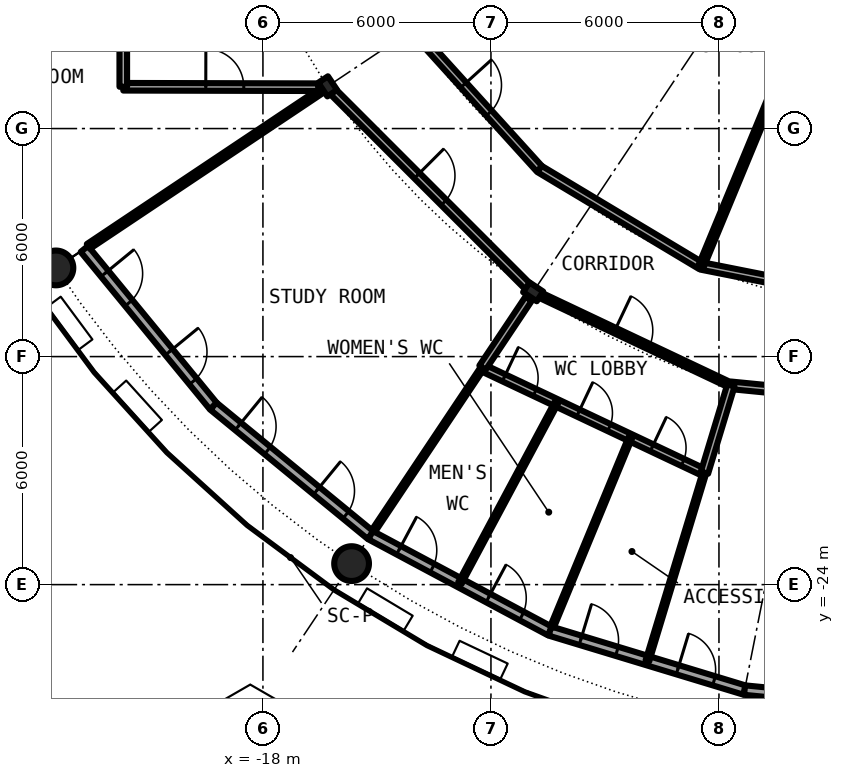
"""IFC4 building model, lengths in metres.
Left out: names, types, materials, properties, quantities, classifications, styles, units other than length and angle.
Written with IfcOpenShell. Run it as: python <this file> out.ifc"""

import sys

from ifc_helpers import new_model, si_unit, direction, frame, frame_2d, origin, origin_2d, place, context, subcontext, project, spatial, rectangle, hollow_circle, i_section, extrude, element, fill, save


model = new_model("IFC4")
c1 = context("Model", 3, precision=1e-05, world=origin(), true_north=direction((0.0, 1.0)))
c2 = subcontext(c1, "Body", "Model", "MODEL_VIEW")
j1 = project(units=[si_unit("LENGTHUNIT", "METRE"), si_unit("PLANEANGLEUNIT", "RADIAN")], contexts=[c1])
p1 = place(None, origin())
s1 = spatial("IfcSite", under=j1, at=p1, CompositionType="ELEMENT")
p2 = place(p1, origin())
s2 = spatial("IfcBuilding", under=s1, at=p2, CompositionType="ELEMENT")
p3 = place(p2, frame((0.0, 0.0, 107.45)))
s3 = spatial("IfcBuildingStorey", under=s2, at=p3, CompositionType="ELEMENT", Elevation=107.45)
for number, where, z_axis, x_axis in (
    (1, (-23.448, -15.667, 0.0), (0.0, 0.0, 1.0), (1.0, 0.0, 0.0)),
    (2, (-15.667, -23.448, 0.0), (0.0, 0.0, 1.0), (1.0, 0.0, 0.0)),
):
    element("IfcColumn", number, at=place(p3, frame(where, z_axis=z_axis, x_axis=x_axis)), inside=s3, PredefinedType="COLUMN", context=c2, shape_type="SweptSolid", body=[
        extrude(hollow_circle(Radius=0.457, WallThickness=0.04, at=origin_2d()), origin(), (0.0, 0.0, 1.0), 4.2),
    ])
for number, where, z_axis, x_axis in (
    (3, (-16.297, -10.889, 0.0), (0.0, 0.0, 1.0), (-0.831, -0.556, 0.0)),
    (4, (-10.889, -16.297, 0.0), (0.0, 0.0, 1.0), (-0.556, -0.831, 0.0)),
):
    element("IfcColumn", number, at=place(p3, frame(where, z_axis=z_axis, x_axis=x_axis)), inside=s3, PredefinedType="COLUMN", context=c2, shape_type="SweptSolid", body=[
        extrude(i_section(OverallWidth=0.307, OverallDepth=0.432, WebThickness=0.021, FlangeThickness=0.04, FilletRadius=0.027, at=origin_2d()), origin(), (0.0, 0.0, 1.0), 4.2),
    ])
p4 = place(p3, frame((-22.699, -15.167, 0.0), z_axis=(0.0, 0.0, 1.0), x_axis=(0.634382322723, -0.773019449054, 0.0)))
e5 = element("IfcWall", 5, at=p4, inside=s3, PredefinedType="SOLIDWALL", context=c2, shape_type="SweptSolid", body=[
    extrude(rectangle(XDim=5.352, YDim=0.25, at=frame_2d((2.676, 0.0))), origin(), (0.0, 0.0, 1.0), 3.85),
])
p5 = place(p4, frame((0.841, 0.0, 0.0)))
e6 = element("IfcOpeningElement", 6, at=p5, cuts=e5, PredefinedType="OPENING", context=c2, shape_type="SweptSolid", body=[
    extrude(rectangle(XDim=1.0, YDim=2.2, at=frame_2d((0.5, 1.1))), frame((0.0, 0.135, 0.0), z_axis=(0.0, -1.0, 0.0), x_axis=(1.0, 0.0, 0.0)), (0.0, 0.0, 1.0), 0.27),
])
p6 = place(p4, frame((3.51, 0.0, 0.0)))
e7 = element("IfcOpeningElement", 7, at=p6, cuts=e5, PredefinedType="OPENING", context=c2, shape_type="SweptSolid", body=[
    extrude(rectangle(XDim=1.0, YDim=2.2, at=frame_2d((0.5, 1.1))), frame((0.0, 0.135, 0.0), z_axis=(0.0, -1.0, 0.0), x_axis=(1.0, 0.0, 0.0)), (0.0, 0.0, 1.0), 0.27),
])
p7 = place(p3, frame((-19.304, -19.304, 0.0), z_axis=(0.0, 0.0, 1.0), x_axis=(0.773019449054, -0.634382322723, 0.0)))
e8 = element("IfcWall", 8, at=p7, inside=s3, PredefinedType="SOLIDWALL", context=c2, shape_type="SweptSolid", body=[
    extrude(rectangle(XDim=5.352, YDim=0.25, at=frame_2d((2.676, 0.0))), origin(), (0.0, 0.0, 1.0), 3.85),
])
p8 = place(p7, frame((0.841, 0.0, 0.0)))
e9 = element("IfcOpeningElement", 9, at=p8, cuts=e8, PredefinedType="OPENING", context=c2, shape_type="SweptSolid", body=[
    extrude(rectangle(XDim=1.0, YDim=2.2, at=frame_2d((0.5, 1.1))), frame((0.0, 0.135, 0.0), z_axis=(0.0, -1.0, 0.0), x_axis=(1.0, 0.0, 0.0)), (0.0, 0.0, 1.0), 0.27),
])
p9 = place(p7, frame((3.51, 0.0, 0.0)))
e10 = element("IfcOpeningElement", 10, at=p9, cuts=e8, PredefinedType="OPENING", context=c2, shape_type="SweptSolid", body=[
    extrude(rectangle(XDim=1.0, YDim=2.2, at=frame_2d((0.5, 1.1))), frame((0.0, 0.135, 0.0), z_axis=(0.0, -1.0, 0.0), x_axis=(1.0, 0.0, 0.0)), (0.0, 0.0, 1.0), 0.27),
])
p10 = place(p3, frame((-15.167, -22.699, 0.0), z_axis=(0.0, 0.0, 1.0), x_axis=(0.881915646801, -0.471407246368, 0.0)))
e11 = element("IfcWall", 11, at=p10, inside=s3, PredefinedType="SOLIDWALL", context=c2, shape_type="SweptSolid", body=[
    extrude(rectangle(XDim=5.352, YDim=0.25, at=frame_2d((2.676, 0.0))), origin(), (0.0, 0.0, 1.0), 3.85),
])
p11 = place(p10, frame((0.841, 0.0, 0.0)))
e12 = element("IfcOpeningElement", 12, at=p11, cuts=e11, PredefinedType="OPENING", context=c2, shape_type="SweptSolid", body=[
    extrude(rectangle(XDim=1.0, YDim=2.2, at=frame_2d((0.5, 1.1))), frame((0.0, 0.135, 0.0), z_axis=(0.0, -1.0, 0.0), x_axis=(1.0, 0.0, 0.0)), (0.0, 0.0, 1.0), 0.27),
])
p12 = place(p10, frame((3.51, 0.0, 0.0)))
e13 = element("IfcOpeningElement", 13, at=p12, cuts=e11, PredefinedType="OPENING", context=c2, shape_type="SweptSolid", body=[
    extrude(rectangle(XDim=1.0, YDim=2.2, at=frame_2d((0.5, 1.1))), frame((0.0, 0.135, 0.0), z_axis=(0.0, -1.0, 0.0), x_axis=(1.0, 0.0, 0.0)), (0.0, 0.0, 1.0), 0.27),
])
p13 = place(p3, frame((-10.447, -25.222, 0.0), z_axis=(0.0, 0.0, 1.0), x_axis=(0.956965678721, -0.290201119486, 0.0)))
e14 = element("IfcWall", 14, at=p13, inside=s3, PredefinedType="SOLIDWALL", context=c2, shape_type="SweptSolid", body=[
    extrude(rectangle(XDim=5.351, YDim=0.25, at=frame_2d((2.676, 0.0))), origin(), (0.0, 0.0, 1.0), 3.85),
])
p14 = place(p13, frame((0.841, 0.0, 0.0)))
e15 = element("IfcOpeningElement", 15, at=p14, cuts=e14, PredefinedType="OPENING", context=c2, shape_type="SweptSolid", body=[
    extrude(rectangle(XDim=1.0, YDim=2.2, at=frame_2d((0.5, 1.1))), frame((0.0, 0.135, 0.0), z_axis=(0.0, -1.0, 0.0), x_axis=(1.0, 0.0, 0.0)), (0.0, 0.0, 1.0), 0.27),
])
p15 = place(p13, frame((3.51, 0.0, 0.0)))
e16 = element("IfcOpeningElement", 16, at=p15, cuts=e14, PredefinedType="OPENING", context=c2, shape_type="SweptSolid", body=[
    extrude(rectangle(XDim=1.0, YDim=2.2, at=frame_2d((0.5, 1.1))), frame((0.0, 0.135, 0.0), z_axis=(0.0, -1.0, 0.0), x_axis=(1.0, 0.0, 0.0)), (0.0, 0.0, 1.0), 0.27),
])
p16 = place(p3, frame((-5.326, -26.775, 0.0), z_axis=(0.0, 0.0, 1.0), x_axis=(0.995173996315, -0.098126026407, 0.0)))
e17 = element("IfcWall", 17, at=p16, inside=s3, PredefinedType="SOLIDWALL", context=c2, shape_type="SweptSolid", body=[
    extrude(rectangle(XDim=5.352, YDim=0.25, at=frame_2d((2.676, 0.0))), origin(), (0.0, 0.0, 1.0), 3.85),
])
p17 = place(p16, frame((0.841, 0.0, 0.0)))
e18 = element("IfcOpeningElement", 18, at=p17, cuts=e17, PredefinedType="OPENING", context=c2, shape_type="SweptSolid", body=[
    extrude(rectangle(XDim=1.0, YDim=2.2, at=frame_2d((0.5, 1.1))), frame((0.0, 0.135, 0.0), z_axis=(0.0, -1.0, 0.0), x_axis=(1.0, 0.0, 0.0)), (0.0, 0.0, 1.0), 0.27),
])
p18 = place(p16, frame((3.51, 0.0, 0.0)))
e19 = element("IfcOpeningElement", 19, at=p18, cuts=e17, PredefinedType="OPENING", context=c2, shape_type="SweptSolid", body=[
    extrude(rectangle(XDim=1.0, YDim=2.2, at=frame_2d((0.5, 1.1))), frame((0.0, 0.135, 0.0), z_axis=(0.0, -1.0, 0.0), x_axis=(1.0, 0.0, 0.0)), (0.0, 0.0, 1.0), 0.27),
])
p19 = place(p3, frame((-12.223, -18.294, 0.0), z_axis=(0.0, 0.0, 1.0), x_axis=(0.904110764787, -0.427298168726, 0.0)))
e20 = element("IfcWall", 20, at=p19, inside=s3, PredefinedType="PARTITIONING", context=c2, shape_type="SweptSolid", body=[
    extrude(rectangle(XDim=6.459, YDim=0.2, at=frame_2d((3.229, 0.0))), origin(), (0.0, 0.0, 1.0), 3.85),
])
p20 = place(p19, frame((0.624, 0.0, 0.0)))
e21 = element("IfcOpeningElement", 21, at=p20, cuts=e20, PredefinedType="OPENING", context=c2, shape_type="SweptSolid", body=[
    extrude(rectangle(XDim=0.9, YDim=2.3, at=frame_2d((0.45, 1.15))), frame((0.0, 0.11, 0.0), z_axis=(0.0, -1.0, 0.0), x_axis=(1.0, 0.0, 0.0)), (0.0, 0.0, 1.0), 0.22),
])
p21 = place(p19, frame((2.788, 0.0, 0.0)))
e22 = element("IfcOpeningElement", 22, at=p21, cuts=e20, PredefinedType="OPENING", context=c2, shape_type="SweptSolid", body=[
    extrude(rectangle(XDim=0.9, YDim=2.3, at=frame_2d((0.45, 1.15))), frame((0.0, 0.11, 0.0), z_axis=(0.0, -1.0, 0.0), x_axis=(1.0, 0.0, 0.0)), (0.0, 0.0, 1.0), 0.22),
])
p22 = place(p19, frame((4.93, 0.0, 0.0)))
e23 = element("IfcOpeningElement", 23, at=p22, cuts=e20, PredefinedType="OPENING", context=c2, shape_type="SweptSolid", body=[
    extrude(rectangle(XDim=0.9, YDim=2.3, at=frame_2d((0.45, 1.15))), frame((0.0, 0.11, 0.0), z_axis=(0.0, -1.0, 0.0), x_axis=(1.0, 0.0, 0.0)), (0.0, 0.0, 1.0), 0.22),
])
p23 = place(p3, frame((-10.749, -16.363, 0.0), z_axis=(0.0, 0.0, 1.0), x_axis=(0.903968655954, -0.427598724335, 0.0)))
e24 = element("IfcWall", 24, at=p23, inside=s3, PredefinedType="PARTITIONING", context=c2, shape_type="SweptSolid", body=[
    extrude(rectangle(XDim=5.596, YDim=0.15, at=frame_2d((2.798, 0.0))), origin(), (0.0, 0.0, 1.0), 3.54),
])
p24 = place(p23, frame((2.221, 0.0, 0.0)))
e25 = element("IfcOpeningElement", 25, at=p24, cuts=e24, PredefinedType="OPENING", context=c2, shape_type="SweptSolid", body=[
    extrude(rectangle(XDim=1.0, YDim=2.3, at=frame_2d((0.5, 1.15))), frame((0.0, 0.085, 0.0), z_axis=(0.0, -1.0, 0.0), x_axis=(1.0, 0.0, 0.0)), (0.0, 0.0, 1.0), 0.17),
])
p25 = place(p3, frame((-16.186, -11.0, 0.0), z_axis=(0.0, 0.0, 1.0), x_axis=(0.707106781187, -0.707106781187, 0.0)))
e26 = element("IfcWall", 26, at=p25, inside=s3, PredefinedType="PARTITIONING", context=c2, shape_type="SweptSolid", body=[
    extrude(rectangle(XDim=7.334, YDim=0.2, at=frame_2d((3.667, 0.0))), origin(), (0.0, 0.0, 1.0), 3.54),
])
p26 = place(p25, frame((3.167, 0.0, 0.0)))
e27 = element("IfcOpeningElement", 27, at=p26, cuts=e26, PredefinedType="OPENING", context=c2, shape_type="SweptSolid", body=[
    extrude(rectangle(XDim=1.0, YDim=2.3, at=frame_2d((0.5, 1.15))), frame((0.0, 0.11, 0.0), z_axis=(0.0, -1.0, 0.0), x_axis=(1.0, 0.0, 0.0)), (0.0, 0.0, 1.0), 0.22),
])
p27 = place(p3, frame((-5.69, -18.756, 0.0), z_axis=(0.0, 0.0, 1.0), x_axis=(0.995179652705, -0.098068643521, 0.0)))
e28 = element("IfcWall", 28, at=p27, inside=s3, PredefinedType="PARTITIONING", context=c2, shape_type="SweptSolid", body=[
    extrude(rectangle(XDim=7.648, YDim=0.2, at=frame_2d((3.824, 0.0))), origin(), (0.0, 0.0, 1.0), 3.54),
])
p28 = place(p27, frame((2.924, 0.0, 0.0)))
e29 = element("IfcOpeningElement", 29, at=p28, cuts=e28, PredefinedType="OPENING", context=c2, shape_type="SweptSolid", body=[
    extrude(rectangle(XDim=1.8, YDim=2.3, at=frame_2d((0.9, 1.15))), frame((0.0, 0.11, 0.0), z_axis=(0.0, -1.0, 0.0), x_axis=(1.0, 0.0, 0.0)), (0.0, 0.0, 1.0), 0.22),
])
p29 = place(p3, frame((-14.052, -9.389, 0.0), z_axis=(0.0, 0.0, 1.0), x_axis=(0.671579385786, -0.740932607318, 0.0)))
e30 = element("IfcWall", 30, at=p29, inside=s3, PredefinedType="PARTITIONING", context=c2, shape_type="SweptSolid", body=[
    extrude(rectangle(XDim=4.96, YDim=0.2, at=frame_2d((2.48, 0.0))), origin(), (0.0, 0.0, 1.0), 3.85),
])
p30 = place(p29, frame((1.98, 0.0, 0.0)))
e31 = element("IfcOpeningElement", 31, at=p30, cuts=e30, PredefinedType="OPENING", context=c2, shape_type="SweptSolid", body=[
    extrude(rectangle(XDim=1.0, YDim=2.3, at=frame_2d((0.5, 1.15))), frame((0.0, 0.11, 0.0), z_axis=(0.0, -1.0, 0.0), x_axis=(1.0, 0.0, 0.0)), (0.0, 0.0, 1.0), 0.22),
])
p31 = place(p3, frame((-10.721, -13.064, 0.0), z_axis=(0.0, 0.0, 1.0), x_axis=(0.857696997328, -0.514155483074, 0.0)))
e32 = element("IfcWall", 32, at=p31, inside=s3, PredefinedType="PARTITIONING", context=c2, shape_type="SweptSolid", body=[
    extrude(rectangle(XDim=4.96, YDim=0.2, at=frame_2d((2.48, 0.0))), origin(), (0.0, 0.0, 1.0), 3.85),
])
p32 = place(p3, frame((-6.467, -15.614, 0.0), z_axis=(0.0, 0.0, 1.0), x_axis=(0.980799374359, -0.195019453537, 0.0)))
e33 = element("IfcWall", 33, at=p32, inside=s3, PredefinedType="PARTITIONING", context=c2, shape_type="SweptSolid", body=[
    extrude(rectangle(XDim=6.594, YDim=0.2, at=frame_2d((3.297, 0.0))), origin(), (0.0, 0.0, 1.0), 3.85),
])
p33 = place(p32, frame((2.797, 0.0, 0.0)))
e34 = element("IfcOpeningElement", 34, at=p33, cuts=e33, PredefinedType="OPENING", context=c2, shape_type="SweptSolid", body=[
    extrude(rectangle(XDim=1.0, YDim=2.3, at=frame_2d((0.5, 1.15))), frame((0.0, 0.11, 0.0), z_axis=(0.0, -1.0, 0.0), x_axis=(1.0, 0.0, 0.0)), (0.0, 0.0, 1.0), 0.22),
])
p34 = place(p3, frame((-21.675, -10.9, 0.0), z_axis=(0.0, 0.0, 1.0), x_axis=(0.999997173357, -0.002377662213, 0.0)))
e35 = element("IfcWall", 35, at=p34, inside=s3, PredefinedType="PARTITIONING", context=c2, shape_type="SweptSolid", body=[
    extrude(rectangle(XDim=5.134, YDim=0.2, at=frame_2d((2.567, 0.0))), origin(), (0.0, 0.0, 1.0), 3.85),
])
p35 = place(p34, frame((2.171, 0.0, 0.0)))
e36 = element("IfcOpeningElement", 36, at=p35, cuts=e35, PredefinedType="OPENING", context=c2, shape_type="SweptSolid", body=[
    extrude(rectangle(XDim=1.0, YDim=2.3, at=frame_2d((0.5, 1.15))), frame((0.0, 0.11, 0.0), z_axis=(0.0, -1.0, 0.0), x_axis=(1.0, 0.0, 0.0)), (0.0, 0.0, 1.0), 0.22),
])
p36 = place(p3, frame((-22.593, -15.101, 0.0), z_axis=(0.0, 0.0, 1.0), x_axis=(0.83143223768, 0.555626164023, 0.0)))
e37 = element("IfcWall", 37, at=p36, inside=s3, PredefinedType="PARTITIONING", context=c2, shape_type="SweptSolid", body=[
    extrude(rectangle(XDim=7.359, YDim=0.15, at=frame_2d((3.68, 0.0))), origin(), (0.0, 0.0, 1.0), 3.85),
])
p37 = place(p3, frame((-15.098, -22.595, 0.0), z_axis=(0.0, 0.0, 1.0), x_axis=(0.555679526155, 0.831396574573, 0.0)))
e38 = element("IfcWall", 38, at=p37, inside=s3, PredefinedType="PARTITIONING", context=c2, shape_type="SweptSolid", body=[
    extrude(rectangle(XDim=5.176, YDim=0.1, at=frame_2d((2.588, 0.0))), origin(), (0.0, 0.0, 1.0), 3.85),
])
p38 = place(p3, frame((-12.818, -23.962, 0.0), z_axis=(0.0, 0.0, 1.0), x_axis=(0.471698142177, 0.881760093601, 0.0)))
e39 = element("IfcWall", 39, at=p38, inside=s3, PredefinedType="PARTITIONING", context=c2, shape_type="SweptSolid", body=[
    extrude(rectangle(XDim=5.387, YDim=0.1, at=frame_2d((2.693, 0.0))), origin(), (0.0, 0.0, 1.0), 3.85),
])
p39 = place(p3, frame((-12.222, -18.292, 0.0), z_axis=(0.0, 0.0, 1.0), x_axis=(0.555628995846, 0.831430345233, 0.0)))
e40 = element("IfcWall", 40, at=p39, inside=s3, PredefinedType="PARTITIONING", context=c2, shape_type="SweptSolid", body=[
    extrude(rectangle(XDim=2.183, YDim=0.2, at=frame_2d((1.091, 0.0))), origin(), (0.0, 0.0, 1.0), 3.85),
])
p40 = place(p3, frame((-10.391, -25.11, 0.0), z_axis=(0.0, 0.0, 1.0), x_axis=(0.38229040446, 0.924042232075, 0.0)))
e41 = element("IfcWall", 41, at=p40, inside=s3, PredefinedType="PARTITIONING", context=c2, shape_type="SweptSolid", body=[
    extrude(rectangle(XDim=5.386, YDim=0.1, at=frame_2d((2.693, 0.0))), origin(), (0.0, 0.0, 1.0), 3.85),
])
p41 = place(p3, frame((-7.883, -26.007, 0.0), z_axis=(0.0, 0.0, 1.0), x_axis=(0.290185435468, 0.95697043478, 0.0)))
e42 = element("IfcWall", 42, at=p41, inside=s3, PredefinedType="PARTITIONING", context=c2, shape_type="SweptSolid", body=[
    extrude(rectangle(XDim=5.176, YDim=0.1, at=frame_2d((2.588, 0.0))), origin(), (0.0, 0.0, 1.0), 3.85),
])
p42 = place(p3, frame((-6.467, -15.614, 0.0), z_axis=(0.0, 0.0, 1.0), x_axis=(0.382646942224, 0.923894646378, 0.0)))
e43 = element("IfcWall", 43, at=p42, inside=s3, PredefinedType="PARTITIONING", context=c2, shape_type="SweptSolid", body=[
    extrude(rectangle(XDim=9.181, YDim=0.15, at=frame_2d((4.59, 0.0))), origin(), (0.0, 0.0, 1.0), 3.85),
])
p43 = place(p3, frame((-6.381, -21.054, 0.0), z_axis=(0.0, 0.0, 1.0), x_axis=(0.290128842027, 0.956987593976, 0.0)))
e44 = element("IfcWall", 44, at=p43, inside=s3, PredefinedType="PARTITIONING", context=c2, shape_type="SweptSolid", body=[
    extrude(rectangle(XDim=2.399, YDim=0.2, at=frame_2d((1.2, 0.0))), origin(), (0.0, 0.0, 1.0), 3.85),
])
p44 = place(p3, frame((-21.675, -10.9, 0.0), z_axis=(0.0, 0.0, 1.0), x_axis=(0.0, 1.0, 0.0)))
e45 = element("IfcWall", 45, at=p44, inside=s3, PredefinedType="PARTITIONING", context=c2, shape_type="SweptSolid", body=[
    extrude(rectangle(XDim=1.7, YDim=0.2, at=frame_2d((0.85, 0.0))), origin(), (0.0, 0.0, 1.0), 3.85),
])
p45 = place(p5, origin())
e46 = element("IfcDoor", 46, at=p45, inside=s3, OperationType="SINGLE_SWING_LEFT", PredefinedType="DOOR", context=c2, shape_type="SweptSolid", body=[
    extrude(rectangle(XDim=1.0, YDim=2.2, at=frame_2d((0.5, 1.1))), frame((0.0, 0.025, 0.0), z_axis=(0.0, -1.0, 0.0), x_axis=(1.0, 0.0, 0.0)), (0.0, 0.0, 1.0), 0.05),
])
fill(e6, e46)
p46 = place(p6, origin())
e47 = element("IfcDoor", 47, at=p46, inside=s3, OperationType="SINGLE_SWING_LEFT", PredefinedType="DOOR", context=c2, shape_type="SweptSolid", body=[
    extrude(rectangle(XDim=1.0, YDim=2.2, at=frame_2d((0.5, 1.1))), frame((0.0, 0.025, 0.0), z_axis=(0.0, -1.0, 0.0), x_axis=(1.0, 0.0, 0.0)), (0.0, 0.0, 1.0), 0.05),
])
fill(e7, e47)
p47 = place(p8, origin())
e48 = element("IfcDoor", 48, at=p47, inside=s3, OperationType="SINGLE_SWING_LEFT", PredefinedType="DOOR", context=c2, shape_type="SweptSolid", body=[
    extrude(rectangle(XDim=1.0, YDim=2.2, at=frame_2d((0.5, 1.1))), frame((0.0, 0.025, 0.0), z_axis=(0.0, -1.0, 0.0), x_axis=(1.0, 0.0, 0.0)), (0.0, 0.0, 1.0), 0.05),
])
fill(e9, e48)
p48 = place(p9, origin())
e49 = element("IfcDoor", 49, at=p48, inside=s3, OperationType="SINGLE_SWING_LEFT", PredefinedType="DOOR", context=c2, shape_type="SweptSolid", body=[
    extrude(rectangle(XDim=1.0, YDim=2.2, at=frame_2d((0.5, 1.1))), frame((0.0, 0.025, 0.0), z_axis=(0.0, -1.0, 0.0), x_axis=(1.0, 0.0, 0.0)), (0.0, 0.0, 1.0), 0.05),
])
fill(e10, e49)
p49 = place(p11, origin())
e50 = element("IfcDoor", 50, at=p49, inside=s3, OperationType="SINGLE_SWING_LEFT", PredefinedType="DOOR", context=c2, shape_type="SweptSolid", body=[
    extrude(rectangle(XDim=1.0, YDim=2.2, at=frame_2d((0.5, 1.1))), frame((0.0, 0.025, 0.0), z_axis=(0.0, -1.0, 0.0), x_axis=(1.0, 0.0, 0.0)), (0.0, 0.0, 1.0), 0.05),
])
fill(e12, e50)
p50 = place(p12, origin())
e51 = element("IfcDoor", 51, at=p50, inside=s3, OperationType="SINGLE_SWING_LEFT", PredefinedType="DOOR", context=c2, shape_type="SweptSolid", body=[
    extrude(rectangle(XDim=1.0, YDim=2.2, at=frame_2d((0.5, 1.1))), frame((0.0, 0.025, 0.0), z_axis=(0.0, -1.0, 0.0), x_axis=(1.0, 0.0, 0.0)), (0.0, 0.0, 1.0), 0.05),
])
fill(e13, e51)
p51 = place(p14, origin())
e52 = element("IfcDoor", 52, at=p51, inside=s3, OperationType="SINGLE_SWING_LEFT", PredefinedType="DOOR", context=c2, shape_type="SweptSolid", body=[
    extrude(rectangle(XDim=1.0, YDim=2.2, at=frame_2d((0.5, 1.1))), frame((0.0, 0.025, 0.0), z_axis=(0.0, -1.0, 0.0), x_axis=(1.0, 0.0, 0.0)), (0.0, 0.0, 1.0), 0.05),
])
fill(e15, e52)
p52 = place(p15, origin())
e53 = element("IfcDoor", 53, at=p52, inside=s3, OperationType="SINGLE_SWING_LEFT", PredefinedType="DOOR", context=c2, shape_type="SweptSolid", body=[
    extrude(rectangle(XDim=1.0, YDim=2.2, at=frame_2d((0.5, 1.1))), frame((0.0, 0.025, 0.0), z_axis=(0.0, -1.0, 0.0), x_axis=(1.0, 0.0, 0.0)), (0.0, 0.0, 1.0), 0.05),
])
fill(e16, e53)
p53 = place(p24, origin())
e54 = element("IfcDoor", 54, at=p53, inside=s3, OperationType="SINGLE_SWING_LEFT", PredefinedType="DOOR", context=c2, shape_type="SweptSolid", body=[
    extrude(rectangle(XDim=1.0, YDim=2.3, at=frame_2d((0.5, 1.15))), frame((0.0, 0.025, 0.0), z_axis=(0.0, -1.0, 0.0), x_axis=(1.0, 0.0, 0.0)), (0.0, 0.0, 1.0), 0.05),
])
fill(e25, e54)
p54 = place(p20, origin())
e55 = element("IfcDoor", 55, at=p54, inside=s3, OperationType="SINGLE_SWING_LEFT", PredefinedType="DOOR", context=c2, shape_type="SweptSolid", body=[
    extrude(rectangle(XDim=0.9, YDim=2.3, at=frame_2d((0.45, 1.15))), frame((0.0, 0.025, 0.0), z_axis=(0.0, -1.0, 0.0), x_axis=(1.0, 0.0, 0.0)), (0.0, 0.0, 1.0), 0.05),
])
fill(e21, e55)
p55 = place(p21, origin())
e56 = element("IfcDoor", 56, at=p55, inside=s3, OperationType="SINGLE_SWING_RIGHT", PredefinedType="DOOR", context=c2, shape_type="SweptSolid", body=[
    extrude(rectangle(XDim=0.9, YDim=2.3, at=frame_2d((0.45, 1.15))), frame((0.0, 0.025, 0.0), z_axis=(0.0, -1.0, 0.0), x_axis=(1.0, 0.0, 0.0)), (0.0, 0.0, 1.0), 0.05),
])
fill(e22, e56)
p56 = place(p22, origin())
e57 = element("IfcDoor", 57, at=p56, inside=s3, OperationType="SINGLE_SWING_RIGHT", PredefinedType="DOOR", context=c2, shape_type="SweptSolid", body=[
    extrude(rectangle(XDim=0.9, YDim=2.3, at=frame_2d((0.45, 1.15))), frame((0.0, 0.025, 0.0), z_axis=(0.0, -1.0, 0.0), x_axis=(1.0, 0.0, 0.0)), (0.0, 0.0, 1.0), 0.05),
])
fill(e23, e57)
p57 = place(p26, origin())
e58 = element("IfcDoor", 58, at=p57, inside=s3, OperationType="SINGLE_SWING_LEFT", PredefinedType="DOOR", context=c2, shape_type="SweptSolid", body=[
    extrude(rectangle(XDim=1.0, YDim=2.3, at=frame_2d((0.5, 1.15))), frame((0.0, 0.025, 0.0), z_axis=(0.0, -1.0, 0.0), x_axis=(1.0, 0.0, 0.0)), (0.0, 0.0, 1.0), 0.05),
])
fill(e27, e58)
p58 = place(p30, origin())
e59 = element("IfcDoor", 59, at=p58, inside=s3, OperationType="SINGLE_SWING_LEFT", PredefinedType="DOOR", context=c2, shape_type="SweptSolid", body=[
    extrude(rectangle(XDim=1.0, YDim=2.3, at=frame_2d((0.5, 1.15))), frame((0.0, 0.025, 0.0), z_axis=(0.0, -1.0, 0.0), x_axis=(1.0, 0.0, 0.0)), (0.0, 0.0, 1.0), 0.05),
])
fill(e31, e59)
p59 = place(p35, origin())
e60 = element("IfcDoor", 60, at=p59, inside=s3, OperationType="SINGLE_SWING_RIGHT", PredefinedType="DOOR", context=c2, shape_type="SweptSolid", body=[
    extrude(rectangle(XDim=1.0, YDim=2.3, at=frame_2d((0.5, 1.15))), frame((0.0, 0.025, 0.0), z_axis=(0.0, -1.0, 0.0), x_axis=(1.0, 0.0, 0.0)), (0.0, 0.0, 1.0), 0.05),
])
fill(e36, e60)
save(model, sys.argv[1])
